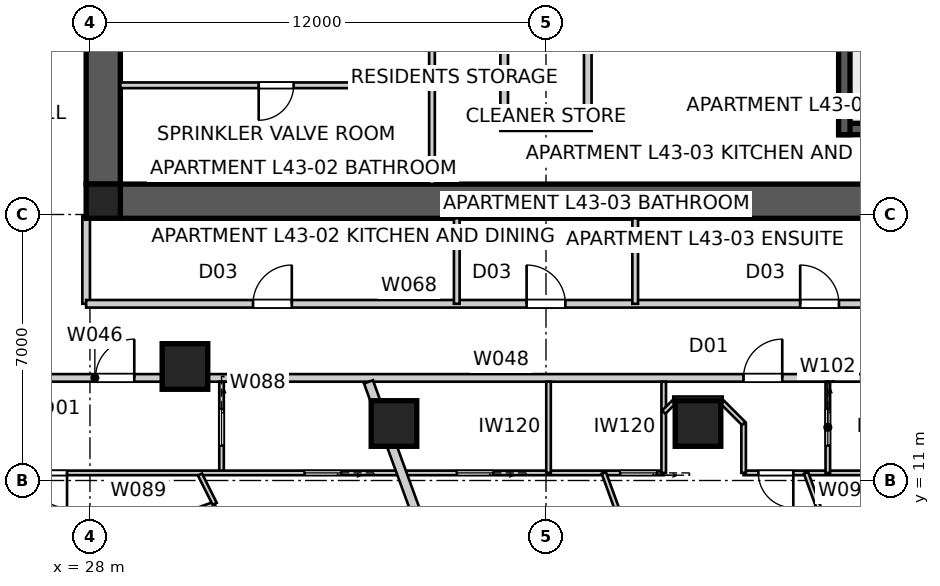
"""IFC4 building model, lengths in metres.
Left out: names, types, materials, properties, quantities, classifications, styles, units other than length and angle.
Written with IfcOpenShell. Run it as: python <this file> out.ifc"""

import sys

from ifc_helpers import new_model, si_unit, direction, frame, frame_2d, origin, origin_2d, place, context, subcontext, project, spatial, polyline, rectangle, outline, extrude, element, fill, save


model = new_model("IFC4")
c1 = context("Model", 3, precision=1e-05, world=origin(), true_north=direction((0.0, 1.0)))
c2 = subcontext(c1, "Body", "Model", "MODEL_VIEW")
j1 = project(units=[si_unit("LENGTHUNIT", "METRE"), si_unit("PLANEANGLEUNIT", "RADIAN")], contexts=[c1])
p1 = place(None, origin())
s1 = spatial("IfcSite", under=j1, at=p1, CompositionType="ELEMENT")
p2 = place(p1, origin())
s2 = spatial("IfcBuilding", under=s1, at=p2, CompositionType="ELEMENT")
p3 = place(p2, frame((0.0, 0.0, 157.4)))
s3 = spatial("IfcBuildingStorey", under=s2, at=p3, CompositionType="ELEMENT", Elevation=157.4)
p4 = place(p3, frame((51.2, 18.35, 0.0), z_axis=(0.0, 0.0, 1.0), x_axis=(-1.0, 0.0, 0.0)))
e1 = element("IfcWall", 1, at=p4, inside=s3, PredefinedType="SHEAR", context=c2, shape_type="SweptSolid", body=[
    extrude(outline(polyline([(0.0, -0.45), (22.4, -0.45), (22.4, -0.025), (22.85, -0.025), (22.85, 0.025), (22.4, 0.025), (22.4, 0.45), (0.0, 0.45), (0.0, 0.025), (-0.45, 0.025), (-0.45, -0.025), (0.0, -0.025), (0.0, -0.45)])), origin(), (0.0, 0.0, 1.0), 3.4),
])
p5 = place(p3, frame((28.35, 41.2, 0.0), z_axis=(0.0, 0.0, 1.0), x_axis=(0.0, -1.0, 0.0)))
e2 = element("IfcWall", 2, at=p5, inside=s3, PredefinedType="SHEAR", context=c2, shape_type="SweptSolid", body=[
    extrude(outline(polyline([(0.0, -0.45), (22.4, -0.45), (22.4, -0.025), (22.85, -0.025), (22.85, 0.025), (22.4, 0.025), (22.4, 0.45), (0.0, 0.45), (0.0, 0.025), (-0.45, 0.025), (-0.45, -0.025), (0.0, -0.025), (0.0, -0.45)])), origin(), (0.0, 0.0, 1.0), 3.4),
])
p6 = place(p5, frame((11.14, 0.0, 0.0)))
e3 = element("IfcOpeningElement", 3, at=p6, cuts=e2, PredefinedType="OPENING", context=c2, shape_type="SweptSolid", body=[
    extrude(rectangle(XDim=1.02, YDim=2.4, at=frame_2d((0.51, 1.2))), frame((0.0, 0.46, 0.0), z_axis=(0.0, -1.0, 0.0), x_axis=(1.0, 0.0, 0.0)), (0.0, 0.0, 1.0), 0.92),
])
p7 = place(p3, frame((47.85, 27.8, 0.0), z_axis=(0.0, 0.0, 1.0), x_axis=(0.0, -1.0, 0.0)))
e4 = element("IfcWall", 4, at=p7, inside=s3, PredefinedType="SHEAR", context=c2, shape_type="SweptSolid", body=[
    extrude(rectangle(XDim=7.7, YDim=0.3, at=frame_2d((3.85, 0.0))), origin(), (0.0, 0.0, 1.0), 3.4),
])
p8 = place(p3, frame((51.2, 20.25, 0.0), z_axis=(0.0, 0.0, 1.0), x_axis=(-1.0, 0.0, 0.0)))
e5 = element("IfcWall", 5, at=p8, inside=s3, PredefinedType="SHEAR", context=c2, shape_type="SweptSolid", body=[
    extrude(rectangle(XDim=3.5, YDim=0.3, at=frame_2d((1.75, 0.0))), origin(), (0.0, 0.0, 1.0), 3.4),
])
for number, where, z_axis, x_axis in (
    (6, (38.9, 22.4, 0.0), (0.0, 0.0, 1.0), (0.0, -1.0, 0.0)),
    (7, (41.1, 22.4, 0.0), (0.0, 0.0, 1.0), (0.0, -1.0, 0.0)),
):
    element("IfcWall", number, at=place(p3, frame(where, z_axis=z_axis, x_axis=x_axis)), inside=s3, PredefinedType="SOLIDWALL", context=c2, shape_type="SweptSolid", body=[
        extrude(rectangle(XDim=2.0, YDim=0.2, at=frame_2d((1.0, 0.0))), origin(), (0.0, 0.0, 1.0), 3.4),
    ])
p9 = place(p3, frame((38.8, 20.3, 0.0), z_axis=(0.0, 0.0, 1.0), x_axis=(1.0, 0.0, 0.0)))
e8 = element("IfcWall", 8, at=p9, inside=s3, PredefinedType="SOLIDWALL", context=c2, shape_type="SweptSolid", body=[
    extrude(rectangle(XDim=2.4, YDim=0.2, at=frame_2d((1.2, 0.0))), origin(), (0.0, 0.0, 1.0), 3.4),
])
p10 = place(p3, frame((28.35, 18.35, 0.0), z_axis=(0.0, 0.0, 1.0), x_axis=(1.0, 0.0, 0.0)))
e9 = element("IfcColumn", 9, at=p10, inside=s3, PredefinedType="COLUMN", context=c2, shape_type="SweptSolid", body=[
    extrude(rectangle(XDim=0.9, YDim=0.9, at=origin_2d()), origin(), (0.0, 0.0, 1.0), 3.4),
])
for number, where, z_axis, x_axis in (
    (10, (30.5, 14.0, 0.0), (0.0, 0.0, 1.0), (1.0, 0.0, 0.0)),
    (11, (36.0, 12.5, 0.0), (0.0, 0.0, 1.0), (1.0, 0.0, 0.0)),
    (12, (44.0, 12.5, 0.0), (0.0, 0.0, 1.0), (1.0, 0.0, 0.0)),
):
    element("IfcColumn", number, at=place(p3, frame(where, z_axis=z_axis, x_axis=x_axis)), inside=s3, PredefinedType="COLUMN", context=c2, shape_type="SweptSolid", body=[
        extrude(rectangle(XDim=1.2, YDim=1.2, at=origin_2d()), origin(), (0.0, 0.0, 1.0), 3.4),
    ])
p11 = place(p3, frame((25.5, 13.7, 0.0), z_axis=(0.0, 0.0, 1.0), x_axis=(1.0, 0.0, 0.0)))
e13 = element("IfcWall", 13, at=p11, inside=s3, PredefinedType="PARTITIONING", context=c2, shape_type="SweptSolid", body=[
    extrude(rectangle(XDim=5.258, YDim=0.2, at=frame_2d((2.629, 0.0))), origin(), (0.0, 0.0, 1.0), 3.25),
])
p12 = place(p11, frame((2.646, 0.0, 0.0)))
e14 = element("IfcOpeningElement", 14, at=p12, cuts=e13, PredefinedType="OPENING", context=c2, shape_type="SweptSolid", body=[
    extrude(rectangle(XDim=1.02, YDim=2.34, at=frame_2d((0.51, 1.17))), frame((0.0, 0.11, 0.0), z_axis=(0.0, -1.0, 0.0), x_axis=(1.0, 0.0, 0.0)), (0.0, 0.0, 1.0), 0.22),
])
p13 = place(p3, frame((30.758, 13.7, 0.0), z_axis=(0.0, 0.0, 1.0), x_axis=(1.0, 0.0, 0.0)))
e15 = element("IfcWall", 15, at=p13, inside=s3, PredefinedType="PARTITIONING", context=c2, shape_type="SweptSolid", body=[
    extrude(rectangle(XDim=1.683, YDim=0.2, at=frame_2d((0.842, 0.0))), origin(), (0.0, 0.0, 1.0), 2.55),
])
p14 = place(p3, frame((32.442, 13.7, 0.0), z_axis=(0.0, 0.0, 1.0), x_axis=(1.0, 0.0, 0.0)))
e16 = element("IfcWall", 16, at=p14, inside=s3, PredefinedType="PARTITIONING", context=c2, shape_type="SweptSolid", body=[
    extrude(rectangle(XDim=15.117, YDim=0.2, at=frame_2d((7.558, 0.0))), origin(), (0.0, 0.0, 1.0), 3.25),
])
p15 = place(p14, frame((12.755, 0.0, 0.0)))
e17 = element("IfcOpeningElement", 17, at=p15, cuts=e16, PredefinedType="OPENING", context=c2, shape_type="SweptSolid", body=[
    extrude(rectangle(XDim=1.02, YDim=2.34, at=frame_2d((0.51, 1.17))), frame((0.0, 0.11, 0.0), z_axis=(0.0, -1.0, 0.0), x_axis=(1.0, 0.0, 0.0)), (0.0, 0.0, 1.0), 0.22),
])
p16 = place(p3, frame((47.558, 13.7, 0.0), z_axis=(0.0, 0.0, 1.0), x_axis=(1.0, 0.0, 0.0)))
e18 = element("IfcWall", 18, at=p16, inside=s3, PredefinedType="PARTITIONING", context=c2, shape_type="SweptSolid", body=[
    extrude(rectangle(XDim=1.683, YDim=0.2, at=frame_2d((0.842, 0.0))), origin(), (0.0, 0.0, 1.0), 2.55),
])
p17 = place(p3, frame((38.812, 4.027, 0.0), z_axis=(0.0, 0.0, 1.0), x_axis=(-0.342027987857, 0.939689765573, 0.0)))
e19 = element("IfcWall", 19, at=p17, inside=s3, PredefinedType="PARTITIONING", context=c2, shape_type="SweptSolid", body=[
    extrude(rectangle(XDim=10.182, YDim=0.25, at=frame_2d((5.091, 0.0))), origin(), (0.0, 0.0, 1.0), 3.25),
])
p18 = place(p3, frame((37.0, 18.8, 0.0), z_axis=(0.0, 0.0, 1.0), x_axis=(0.0, 1.0, 0.0)))
e20 = element("IfcWall", 20, at=p18, inside=s3, PredefinedType="SOLIDWALL", context=c2, shape_type="SweptSolid", body=[
    extrude(rectangle(XDim=5.9, YDim=0.15, at=frame_2d((2.95, 0.0))), origin(), (0.0, 0.0, 1.0), 3.25),
])
p19 = place(p3, frame((37.0, 21.4, 0.0), z_axis=(0.0, 0.0, 1.0), x_axis=(-1.0, 0.0, 0.0)))
e21 = element("IfcWall", 21, at=p19, inside=s3, PredefinedType="SOLIDWALL", context=c2, shape_type="SweptSolid", body=[
    extrude(rectangle(XDim=8.2, YDim=0.15, at=frame_2d((4.1, 0.0))), origin(), (0.0, 0.0, 1.0), 3.25),
])
p20 = place(p19, frame((3.64, 0.0, 0.0)))
e22 = element("IfcOpeningElement", 22, at=p20, cuts=e21, PredefinedType="OPENING", context=c2, shape_type="SweptSolid", body=[
    extrude(rectangle(XDim=0.92, YDim=2.1, at=frame_2d((0.46, 1.05))), frame((0.0, 0.085, 0.0), z_axis=(0.0, -1.0, 0.0), x_axis=(1.0, 0.0, 0.0)), (0.0, 0.0, 1.0), 0.17),
])
p21 = place(p3, frame((27.9, 17.95, 0.0), z_axis=(0.0, 0.0, 1.0), x_axis=(0.0, -1.0, 0.0)))
e23 = element("IfcWall", 23, at=p21, inside=s3, PredefinedType="PARTITIONING", context=c2, shape_type="SweptSolid", body=[
    extrude(rectangle(XDim=2.3, YDim=0.2, at=frame_2d((1.15, 0.0))), origin(), (0.0, 0.0, 1.0), 3.25),
])
p22 = place(p3, frame((27.9, 15.65, 0.0), z_axis=(0.0, 0.0, 1.0), x_axis=(1.0, 0.0, 0.0)))
e24 = element("IfcWall", 24, at=p22, inside=s3, PredefinedType="PARTITIONING", context=c2, shape_type="SweptSolid", body=[
    extrude(rectangle(XDim=24.2, YDim=0.2, at=frame_2d((12.1, 0.0))), origin(), (0.0, 0.0, 1.0), 3.25),
])
p23 = place(p22, frame((4.391, 0.0, 0.0)))
e25 = element("IfcOpeningElement", 25, at=p23, cuts=e24, PredefinedType="OPENING", context=c2, shape_type="SweptSolid", body=[
    extrude(rectangle(XDim=1.02, YDim=2.1, at=frame_2d((0.51, 1.05))), frame((0.0, 0.11, 0.0), z_axis=(0.0, -1.0, 0.0), x_axis=(1.0, 0.0, 0.0)), (0.0, 0.0, 1.0), 0.22),
])
p24 = place(p22, frame((18.789, 0.0, 0.0)))
e26 = element("IfcOpeningElement", 26, at=p24, cuts=e24, PredefinedType="OPENING", context=c2, shape_type="SweptSolid", body=[
    extrude(rectangle(XDim=1.02, YDim=2.1, at=frame_2d((0.51, 1.05))), frame((0.0, 0.11, 0.0), z_axis=(0.0, -1.0, 0.0), x_axis=(1.0, 0.0, 0.0)), (0.0, 0.0, 1.0), 0.22),
])
p25 = place(p22, frame((11.59, 0.0, 0.0)))
e27 = element("IfcOpeningElement", 27, at=p25, cuts=e24, PredefinedType="OPENING", context=c2, shape_type="SweptSolid", body=[
    extrude(rectangle(XDim=1.02, YDim=2.1, at=frame_2d((0.51, 1.05))), frame((0.0, 0.11, 0.0), z_axis=(0.0, -1.0, 0.0), x_axis=(1.0, 0.0, 0.0)), (0.0, 0.0, 1.0), 0.22),
])
for number, where, z_axis, x_axis in (
    (28, (37.653, 15.65, 0.0), (0.0, 0.0, 1.0), (0.0, 1.0, 0.0)),
    (29, (42.347, 15.65, 0.0), (0.0, 0.0, 1.0), (0.0, 1.0, 0.0)),
):
    element("IfcWall", number, at=place(p3, frame(where, z_axis=z_axis, x_axis=x_axis)), inside=s3, PredefinedType="SOLIDWALL", context=c2, shape_type="SweptSolid", body=[
        extrude(rectangle(XDim=2.25, YDim=0.15, at=frame_2d((1.125, 0.0))), origin(), (0.0, 0.0, 1.0), 3.25),
    ])
p26 = place(p3, frame((31.462, 13.6, 0.0), z_axis=(0.0, 0.0, 1.0), x_axis=(0.0, -1.0, 0.0)))
e30 = element("IfcWall", 30, at=p26, inside=s3, PredefinedType="PARTITIONING", context=c2, shape_type="SweptSolid", body=[
    extrude(rectangle(XDim=2.4, YDim=0.12, at=frame_2d((1.2, 0.0))), origin(), (0.0, 0.0, 1.0), 3.25),
])
p27 = place(p26, frame((0.72, 0.0, 0.0)))
e31 = element("IfcOpeningElement", 31, at=p27, cuts=e30, PredefinedType="OPENING", context=c2, shape_type="SweptSolid", body=[
    extrude(rectangle(XDim=0.96, YDim=2.1, at=frame_2d((0.48, 1.05))), frame((0.0, 0.07, 0.0), z_axis=(0.0, -1.0, 0.0), x_axis=(1.0, 0.0, 0.0)), (0.0, 0.0, 1.0), 0.14),
])
p28 = place(p3, frame((43.098, 11.2, 0.0), z_axis=(0.0, 0.0, 1.0), x_axis=(-1.0, 0.0, 0.0)))
e32 = element("IfcWall", 32, at=p28, inside=s3, PredefinedType="PARTITIONING", context=c2, shape_type="SweptSolid", body=[
    extrude(rectangle(XDim=20.098, YDim=0.12, at=frame_2d((10.049, 0.0))), origin(), (0.0, 0.0, 1.0), 3.25),
])
p29 = place(p28, frame((15.701, 0.0, 0.0)))
e33 = element("IfcOpeningElement", 33, at=p29, cuts=e32, PredefinedType="OPENING", context=c2, shape_type="SweptSolid", body=[
    extrude(rectangle(XDim=0.92, YDim=2.34, at=frame_2d((0.46, 1.17))), frame((0.0, 0.07, 0.0), z_axis=(0.0, -1.0, 0.0), x_axis=(1.0, 0.0, 0.0)), (0.0, 0.0, 1.0), 0.14),
])
p30 = place(p28, frame((8.49, 0.0, 0.0)))
e34 = element("IfcOpeningElement", 34, at=p30, cuts=e32, PredefinedType="OPENING", context=c2, shape_type="SweptSolid", body=[
    extrude(rectangle(XDim=0.96, YDim=2.1, at=frame_2d((0.48, 1.05))), frame((0.0, 0.07, 0.0), z_axis=(0.0, -1.0, 0.0), x_axis=(1.0, 0.0, 0.0)), (0.0, 0.0, 1.0), 0.14),
])
p31 = place(p28, frame((0.185, 0.0, 0.0)))
e35 = element("IfcOpeningElement", 35, at=p31, cuts=e32, PredefinedType="OPENING", context=c2, shape_type="SweptSolid", body=[
    extrude(rectangle(XDim=0.96, YDim=2.1, at=frame_2d((0.48, 1.05))), frame((0.0, 0.07, 0.0), z_axis=(0.0, -1.0, 0.0), x_axis=(1.0, 0.0, 0.0)), (0.0, 0.0, 1.0), 0.14),
])
p32 = place(p28, frame((4.484, 0.0, 0.0)))
e36 = element("IfcOpeningElement", 36, at=p32, cuts=e32, PredefinedType="OPENING", context=c2, shape_type="SweptSolid", body=[
    extrude(rectangle(XDim=0.96, YDim=2.1, at=frame_2d((0.48, 1.05))), frame((0.0, 0.07, 0.0), z_axis=(0.0, -1.0, 0.0), x_axis=(1.0, 0.0, 0.0)), (0.0, 0.0, 1.0), 0.14),
])
p33 = place(p3, frame((22.769, 7.287, 0.0), z_axis=(0.0, 0.0, 1.0), x_axis=(0.939692673089, 0.342019999623, 0.0)))
e37 = element("IfcWall", 37, at=p33, inside=s3, PredefinedType="PARTITIONING", context=c2, shape_type="SweptSolid", body=[
    extrude(rectangle(XDim=9.06, YDim=0.12, at=frame_2d((4.53, 0.0))), origin(), (0.0, 0.0, 1.0), 3.25),
])
p34 = place(p3, frame((31.283, 10.385, 0.0), z_axis=(0.0, 0.0, 1.0), x_axis=(-0.448117513314, 0.893974660861, 0.0)))
e38 = element("IfcWall", 38, at=p34, inside=s3, PredefinedType="PARTITIONING", context=c2, shape_type="SweptSolid", body=[
    extrude(rectangle(XDim=0.864, YDim=0.12, at=frame_2d((0.432, 0.0))), origin(), (0.0, 0.0, 1.0), 3.25),
])
p35 = place(p3, frame((43.098, 11.2, 0.0), z_axis=(0.0, 0.0, 1.0), x_axis=(0.0, 1.0, 0.0)))
e39 = element("IfcWall", 39, at=p35, inside=s3, PredefinedType="PARTITIONING", context=c2, shape_type="SweptSolid", body=[
    extrude(rectangle(XDim=2.4, YDim=0.12, at=frame_2d((1.2, 0.0))), origin(), (0.0, 0.0, 1.0), 3.25),
])
p36 = place(p3, frame((52.164, 11.2, 0.0), z_axis=(0.0, 0.0, 1.0), x_axis=(-1.0, 0.0, 0.0)))
e40 = element("IfcWall", 40, at=p36, inside=s3, PredefinedType="PARTITIONING", context=c2, shape_type="SweptSolid", body=[
    extrude(rectangle(XDim=6.964, YDim=0.12, at=frame_2d((3.482, 0.0))), origin(), (0.0, 0.0, 1.0), 3.25),
])
p37 = place(p36, frame((5.656, 0.0, 0.0)))
e41 = element("IfcOpeningElement", 41, at=p37, cuts=e40, PredefinedType="OPENING", context=c2, shape_type="SweptSolid", body=[
    extrude(rectangle(XDim=0.92, YDim=2.34, at=frame_2d((0.46, 1.17))), frame((0.0, 0.07, 0.0), z_axis=(0.0, -1.0, 0.0), x_axis=(1.0, 0.0, 0.0)), (0.0, 0.0, 1.0), 0.14),
])
p38 = place(p36, frame((1.919, 0.0, 0.0)))
e42 = element("IfcOpeningElement", 42, at=p38, cuts=e40, PredefinedType="OPENING", context=c2, shape_type="SweptSolid", body=[
    extrude(rectangle(XDim=0.96, YDim=2.1, at=frame_2d((0.48, 1.05))), frame((0.0, 0.07, 0.0), z_axis=(0.0, -1.0, 0.0), x_axis=(1.0, 0.0, 0.0)), (0.0, 0.0, 1.0), 0.14),
])
p39 = place(p3, frame((45.2, 11.2, 0.0), z_axis=(0.0, 0.0, 1.0), x_axis=(0.0, 1.0, 0.0)))
e43 = element("IfcWall", 43, at=p39, inside=s3, PredefinedType="PARTITIONING", context=c2, shape_type="SweptSolid", body=[
    extrude(rectangle(XDim=1.3, YDim=0.12, at=frame_2d((0.65, 0.0))), origin(), (0.0, 0.0, 1.0), 3.25),
])
p40 = place(p3, frame((45.2, 12.5, 0.0), z_axis=(0.0, 0.0, 1.0), x_axis=(-0.707106781187, 0.707106781187, 0.0)))
e44 = element("IfcWall", 44, at=p40, inside=s3, PredefinedType="PARTITIONING", context=c2, shape_type="SweptSolid", body=[
    extrude(rectangle(XDim=0.778, YDim=0.12, at=frame_2d((0.389, 0.0))), origin(), (0.0, 0.0, 1.0), 3.25),
])
p41 = place(p3, frame((44.65, 13.15, 0.0), z_axis=(0.0, 0.0, 1.0), x_axis=(-1.0, 0.0, 0.0)))
e45 = element("IfcWall", 45, at=p41, inside=s3, PredefinedType="PARTITIONING", context=c2, shape_type="SweptSolid", body=[
    extrude(rectangle(XDim=1.3, YDim=0.12, at=frame_2d((0.65, 0.0))), origin(), (0.0, 0.0, 1.0), 3.25),
])
p42 = place(p3, frame((43.35, 13.05, 0.0), z_axis=(0.0, 0.0, 1.0), x_axis=(-0.707106781187, -0.707106781187, 0.0)))
e46 = element("IfcWall", 46, at=p42, inside=s3, PredefinedType="PARTITIONING", context=c2, shape_type="SweptSolid", body=[
    extrude(rectangle(XDim=0.357, YDim=0.12, at=frame_2d((0.178, 0.0))), origin(), (0.0, 0.0, 1.0), 3.25),
])
p43 = place(p3, frame((47.416, 13.6, 0.0), z_axis=(0.0, 0.0, 1.0), x_axis=(0.0, -1.0, 0.0)))
e47 = element("IfcWall", 47, at=p43, inside=s3, PredefinedType="PARTITIONING", context=c2, shape_type="SweptSolid", body=[
    extrude(rectangle(XDim=2.4, YDim=0.12, at=frame_2d((1.2, 0.0))), origin(), (0.0, 0.0, 1.0), 3.25),
])
p44 = place(p43, frame((0.72, 0.0, 0.0)))
e48 = element("IfcOpeningElement", 48, at=p44, cuts=e47, PredefinedType="OPENING", context=c2, shape_type="SweptSolid", body=[
    extrude(rectangle(XDim=0.96, YDim=2.1, at=frame_2d((0.48, 1.05))), frame((0.0, 0.07, 0.0), z_axis=(0.0, -1.0, 0.0), x_axis=(1.0, 0.0, 0.0)), (0.0, 0.0, 1.0), 0.14),
])
p45 = place(p3, frame((40.067, 13.6, 0.0), z_axis=(0.0, 0.0, 1.0), x_axis=(0.0, -1.0, 0.0)))
e49 = element("IfcWall", 49, at=p45, inside=s3, PredefinedType="PARTITIONING", context=c2, shape_type="SweptSolid", body=[
    extrude(rectangle(XDim=2.4, YDim=0.12, at=frame_2d((1.2, 0.0))), origin(), (0.0, 0.0, 1.0), 2.796),
])
p46 = place(p3, frame((41.522, 11.2, 0.0), z_axis=(0.0, 0.0, 1.0), x_axis=(0.342028262279, -0.939689665689, 0.0)))
e50 = element("IfcWall", 50, at=p46, inside=s3, PredefinedType="PARTITIONING", context=c2, shape_type="SweptSolid", body=[
    extrude(rectangle(XDim=5.773, YDim=0.12, at=frame_2d((2.887, 0.0))), origin(), (0.0, 0.0, 1.0), 3.25),
])
p47 = place(p46, frame((2.447, 0.0, 0.0)))
e51 = element("IfcOpeningElement", 51, at=p47, cuts=e50, PredefinedType="OPENING", context=c2, shape_type="SweptSolid", body=[
    extrude(rectangle(XDim=0.92, YDim=2.34, at=frame_2d((0.46, 1.17))), frame((0.0, 0.07, 0.0), z_axis=(0.0, -1.0, 0.0), x_axis=(1.0, 0.0, 0.0)), (0.0, 0.0, 1.0), 0.14),
])
p48 = place(p3, frame((46.843, 11.2, 0.0), z_axis=(0.0, 0.0, 1.0), x_axis=(0.341990966768, -0.939703239672, 0.0)))
e52 = element("IfcWall", 52, at=p48, inside=s3, PredefinedType="PARTITIONING", context=c2, shape_type="SweptSolid", body=[
    extrude(rectangle(XDim=3.953, YDim=0.12, at=frame_2d((1.977, 0.0))), origin(), (0.0, 0.0, 1.0), 3.25),
])
p49 = place(p23, origin())
e53 = element("IfcDoor", 53, at=p49, inside=s3, OperationType="SINGLE_SWING_RIGHT", PredefinedType="DOOR", context=c2, shape_type="SweptSolid", body=[
    extrude(rectangle(XDim=1.02, YDim=2.1, at=frame_2d((0.51, 1.05))), frame((0.0, 0.025, 0.0), z_axis=(0.0, -1.0, 0.0), x_axis=(1.0, 0.0, 0.0)), (0.0, 0.0, 1.0), 0.05),
])
fill(e25, e53)
p50 = place(p24, origin())
e54 = element("IfcDoor", 54, at=p50, inside=s3, OperationType="SINGLE_SWING_LEFT", PredefinedType="DOOR", context=c2, shape_type="SweptSolid", body=[
    extrude(rectangle(XDim=1.02, YDim=2.1, at=frame_2d((0.51, 1.05))), frame((0.0, 0.025, 0.0), z_axis=(0.0, -1.0, 0.0), x_axis=(1.0, 0.0, 0.0)), (0.0, 0.0, 1.0), 0.05),
])
fill(e26, e54)
p51 = place(p12, origin())
e55 = element("IfcDoor", 55, at=p51, inside=s3, OperationType="SINGLE_SWING_RIGHT", PredefinedType="DOOR", context=c2, shape_type="SweptSolid", body=[
    extrude(rectangle(XDim=1.02, YDim=2.34, at=frame_2d((0.51, 1.17))), frame((0.0, 0.025, 0.0), z_axis=(0.0, -1.0, 0.0), x_axis=(1.0, 0.0, 0.0)), (0.0, 0.0, 1.0), 0.05),
])
fill(e14, e55)
p52 = place(p15, origin())
e56 = element("IfcDoor", 56, at=p52, inside=s3, OperationType="SINGLE_SWING_RIGHT", PredefinedType="DOOR", context=c2, shape_type="SweptSolid", body=[
    extrude(rectangle(XDim=1.02, YDim=2.34, at=frame_2d((0.51, 1.17))), frame((0.0, 0.025, 0.0), z_axis=(0.0, -1.0, 0.0), x_axis=(1.0, 0.0, 0.0)), (0.0, 0.0, 1.0), 0.05),
])
fill(e17, e56)
p53 = place(p25, origin())
e57 = element("IfcDoor", 57, at=p53, inside=s3, OperationType="SINGLE_SWING_LEFT", PredefinedType="DOOR", context=c2, shape_type="SweptSolid", body=[
    extrude(rectangle(XDim=1.02, YDim=2.1, at=frame_2d((0.51, 1.05))), frame((0.0, 0.025, 0.0), z_axis=(0.0, -1.0, 0.0), x_axis=(1.0, 0.0, 0.0)), (0.0, 0.0, 1.0), 0.05),
])
fill(e27, e57)
p54 = place(p20, origin())
e58 = element("IfcDoor", 58, at=p54, inside=s3, OperationType="SINGLE_SWING_RIGHT", PredefinedType="DOOR", context=c2, shape_type="SweptSolid", body=[
    extrude(rectangle(XDim=0.92, YDim=2.1, at=frame_2d((0.46, 1.05))), frame((0.0, 0.025, 0.0), z_axis=(0.0, -1.0, 0.0), x_axis=(1.0, 0.0, 0.0)), (0.0, 0.0, 1.0), 0.05),
])
fill(e22, e58)
p55 = place(p29, origin())
e59 = element("IfcDoor", 59, at=p55, inside=s3, OperationType="SINGLE_SWING_LEFT", PredefinedType="DOOR", context=c2, shape_type="SweptSolid", body=[
    extrude(rectangle(XDim=0.92, YDim=2.34, at=frame_2d((0.46, 1.17))), frame((0.0, 0.025, 0.0), z_axis=(0.0, -1.0, 0.0), x_axis=(1.0, 0.0, 0.0)), (0.0, 0.0, 1.0), 0.05),
])
fill(e33, e59)
p56 = place(p27, origin())
e60 = element("IfcDoor", 60, at=p56, inside=s3, OperationType="SLIDING_TO_LEFT", PredefinedType="DOOR", context=c2, shape_type="SweptSolid", body=[
    extrude(rectangle(XDim=0.96, YDim=2.1, at=frame_2d((0.48, 1.05))), frame((0.0, 0.025, 0.0), z_axis=(0.0, -1.0, 0.0), x_axis=(1.0, 0.0, 0.0)), (0.0, 0.0, 1.0), 0.05),
])
fill(e31, e60)
p57 = place(p44, origin())
e61 = element("IfcDoor", 61, at=p57, inside=s3, OperationType="SLIDING_TO_LEFT", PredefinedType="DOOR", context=c2, shape_type="SweptSolid", body=[
    extrude(rectangle(XDim=0.96, YDim=2.1, at=frame_2d((0.48, 1.05))), frame((0.0, 0.025, 0.0), z_axis=(0.0, -1.0, 0.0), x_axis=(1.0, 0.0, 0.0)), (0.0, 0.0, 1.0), 0.05),
])
fill(e48, e61)
p58 = place(p37, origin())
e62 = element("IfcDoor", 62, at=p58, inside=s3, OperationType="SINGLE_SWING_LEFT", PredefinedType="DOOR", context=c2, shape_type="SweptSolid", body=[
    extrude(rectangle(XDim=0.92, YDim=2.34, at=frame_2d((0.46, 1.17))), frame((0.0, 0.025, 0.0), z_axis=(0.0, -1.0, 0.0), x_axis=(1.0, 0.0, 0.0)), (0.0, 0.0, 1.0), 0.05),
])
fill(e41, e62)
p59 = place(p30, origin())
e63 = element("IfcDoor", 63, at=p59, inside=s3, OperationType="SLIDING_TO_LEFT", PredefinedType="DOOR", context=c2, shape_type="SweptSolid", body=[
    extrude(rectangle(XDim=0.96, YDim=2.1, at=frame_2d((0.48, 1.05))), frame((0.0, 0.025, 0.0), z_axis=(0.0, -1.0, 0.0), x_axis=(1.0, 0.0, 0.0)), (0.0, 0.0, 1.0), 0.05),
])
fill(e34, e63)
p60 = place(p31, origin())
e64 = element("IfcDoor", 64, at=p60, inside=s3, OperationType="SLIDING_TO_LEFT", PredefinedType="DOOR", context=c2, shape_type="SweptSolid", body=[
    extrude(rectangle(XDim=0.96, YDim=2.1, at=frame_2d((0.48, 1.05))), frame((0.0, 0.025, 0.0), z_axis=(0.0, -1.0, 0.0), x_axis=(1.0, 0.0, 0.0)), (0.0, 0.0, 1.0), 0.05),
])
fill(e35, e64)
p61 = place(p32, origin())
e65 = element("IfcDoor", 65, at=p61, inside=s3, OperationType="SLIDING_TO_LEFT", PredefinedType="DOOR", context=c2, shape_type="SweptSolid", body=[
    extrude(rectangle(XDim=0.96, YDim=2.1, at=frame_2d((0.48, 1.05))), frame((0.0, 0.025, 0.0), z_axis=(0.0, -1.0, 0.0), x_axis=(1.0, 0.0, 0.0)), (0.0, 0.0, 1.0), 0.05),
])
fill(e36, e65)
save(model, sys.argv[1])
